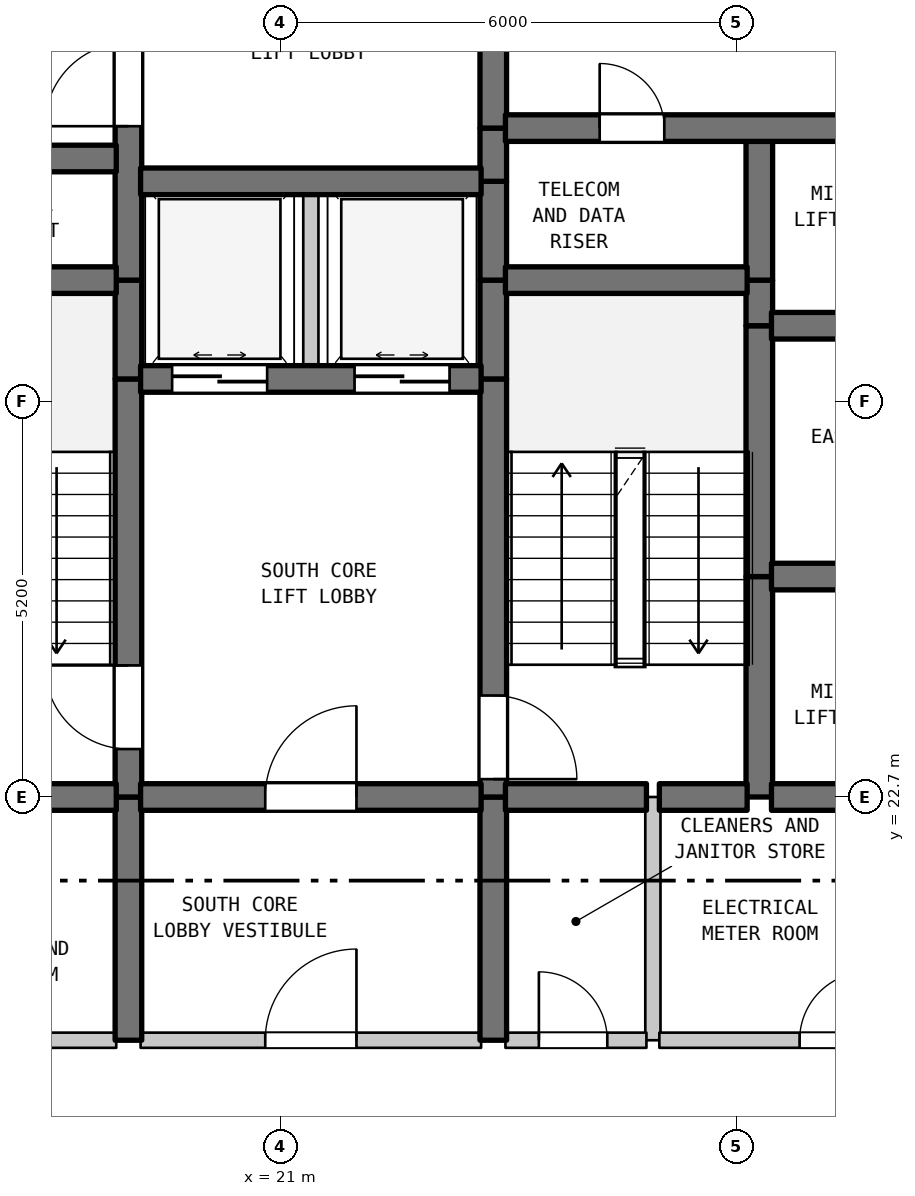
"""IFC4 building model, lengths in metres.
Left out: names, types, materials, properties, quantities, classifications, styles, units other than length and angle.
Written with IfcOpenShell. Run it as: python <this file> out.ifc"""

import sys

from ifc_helpers import new_model, si_unit, direction, frame, frame_2d, origin, place, context, subcontext, project, spatial, rectangle, extrude, element, fill, save


model = new_model("IFC4")
c1 = context("Model", 3, precision=1e-05, world=origin(), true_north=direction((0.0, 1.0)))
c2 = subcontext(c1, "Body", "Model", "MODEL_VIEW")
j1 = project(units=[si_unit("LENGTHUNIT", "METRE"), si_unit("PLANEANGLEUNIT", "RADIAN")], contexts=[c1])
p1 = place(None, origin())
s1 = spatial("IfcSite", under=j1, at=p1, CompositionType="ELEMENT")
p2 = place(p1, origin())
s2 = spatial("IfcBuilding", under=s1, at=p2, CompositionType="ELEMENT")
p3 = place(p2, frame((0.0, 0.0, 222.8)))
s3 = spatial("IfcBuildingStorey", under=s2, at=p3, CompositionType="ELEMENT", Elevation=222.8)
p4 = place(p3, frame((19.0, 19.5, 0.0), z_axis=(0.0, 0.0, 1.0), x_axis=(0.0, 1.0, 0.0)))
e1 = element("IfcWall", 1, at=p4, inside=s3, PredefinedType="SHEAR", context=c2, shape_type="SweptSolid", body=[
    extrude(rectangle(XDim=3.2, YDim=0.35, at=frame_2d((1.6, 0.0))), origin(), (0.0, 0.0, 1.0), 3.39),
])
p5 = place(p3, frame((19.0, 22.7, 0.0), z_axis=(0.0, 0.0, 1.0), x_axis=(0.0, 1.0, 0.0)))
e2 = element("IfcWall", 2, at=p5, inside=s3, PredefinedType="SHEAR", context=c2, shape_type="SweptSolid", body=[
    extrude(rectangle(XDim=5.5, YDim=0.35, at=frame_2d((2.75, 0.0))), origin(), (0.0, 0.0, 1.0), 3.39),
])
p6 = place(p5, frame((0.631, 0.0, 0.0)))
e3 = element("IfcOpeningElement", 3, at=p6, cuts=e2, PredefinedType="OPENING", context=c2, shape_type="SweptSolid", body=[
    extrude(rectangle(XDim=1.1, YDim=2.15, at=frame_2d((0.55, 1.075))), frame((0.0, 0.185, 0.0), z_axis=(0.0, -1.0, 0.0), x_axis=(1.0, 0.0, 0.0)), (0.0, 0.0, 1.0), 0.37),
])
p7 = place(p3, frame((19.0, 28.2, 0.0), z_axis=(0.0, 0.0, 1.0), x_axis=(0.0, 1.0, 0.0)))
e4 = element("IfcWall", 4, at=p7, inside=s3, PredefinedType="SHEAR", context=c2, shape_type="SweptSolid", body=[
    extrude(rectangle(XDim=1.3, YDim=0.35, at=frame_2d((0.65, 0.0))), origin(), (0.0, 0.0, 1.0), 3.39),
])
p8 = place(p3, frame((19.0, 29.5, 0.0), z_axis=(0.0, 0.0, 1.0), x_axis=(0.0, 1.0, 0.0)))
e5 = element("IfcWall", 5, at=p8, inside=s3, PredefinedType="SHEAR", context=c2, shape_type="SweptSolid", body=[
    extrude(rectangle(XDim=5.5, YDim=0.35, at=frame_2d((2.75, 0.0))), origin(), (0.0, 0.0, 1.0), 3.39),
])
p9 = place(p8, frame((2.025, 0.0, 0.0)))
e6 = element("IfcOpeningElement", 6, at=p9, cuts=e5, PredefinedType="OPENING", context=c2, shape_type="SweptSolid", body=[
    extrude(rectangle(XDim=1.1, YDim=2.15, at=frame_2d((0.55, 1.075))), frame((0.0, 0.185, 0.0), z_axis=(0.0, -1.0, 0.0), x_axis=(1.0, 0.0, 0.0)), (0.0, 0.0, 1.0), 0.37),
])
p10 = place(p3, frame((21.4, 28.2, 0.0), z_axis=(0.0, 0.0, 1.0), x_axis=(0.0, 1.0, 0.0)))
e7 = element("IfcWall", 7, at=p10, inside=s3, PredefinedType="STANDARD", context=c2, shape_type="SweptSolid", body=[
    extrude(rectangle(XDim=2.6, YDim=0.2, at=frame_2d((1.3, 0.0))), origin(), (0.0, 0.0, 1.0), 3.39),
])
p11 = place(p3, frame((23.8, 19.5, 0.0), z_axis=(0.0, 0.0, 1.0), x_axis=(0.0, 1.0, 0.0)))
e8 = element("IfcWall", 8, at=p11, inside=s3, PredefinedType="SHEAR", context=c2, shape_type="SweptSolid", body=[
    extrude(rectangle(XDim=3.2, YDim=0.35, at=frame_2d((1.6, 0.0))), origin(), (0.0, 0.0, 1.0), 3.39),
])
p12 = place(p3, frame((23.8, 22.7, 0.0), z_axis=(0.0, 0.0, 1.0), x_axis=(0.0, 1.0, 0.0)))
e9 = element("IfcWall", 9, at=p12, inside=s3, PredefinedType="SHEAR", context=c2, shape_type="SweptSolid", body=[
    extrude(rectangle(XDim=5.5, YDim=0.35, at=frame_2d((2.75, 0.0))), origin(), (0.0, 0.0, 1.0), 3.39),
])
p13 = place(p12, frame((0.235, 0.0, 0.0)))
e10 = element("IfcOpeningElement", 10, at=p13, cuts=e9, PredefinedType="OPENING", context=c2, shape_type="SweptSolid", body=[
    extrude(rectangle(XDim=1.1, YDim=2.15, at=frame_2d((0.55, 1.075))), frame((0.0, 0.185, 0.0), z_axis=(0.0, -1.0, 0.0), x_axis=(1.0, 0.0, 0.0)), (0.0, 0.0, 1.0), 0.37),
])
for number, where, z_axis, x_axis in (
    (11, (23.8, 28.2, 0.0), (0.0, 0.0, 1.0), (0.0, 1.0, 0.0)),
    (12, (23.8, 29.5, 0.0), (0.0, 0.0, 1.0), (0.0, 1.0, 0.0)),
):
    element("IfcWall", number, at=place(p3, frame(where, z_axis=z_axis, x_axis=x_axis)), inside=s3, PredefinedType="SHEAR", context=c2, shape_type="SweptSolid", body=[
        extrude(rectangle(XDim=1.3, YDim=0.35, at=frame_2d((0.65, 0.0))), origin(), (0.0, 0.0, 1.0), 3.39),
    ])
p14 = place(p3, frame((23.8, 30.8, 0.0), z_axis=(0.0, 0.0, 1.0), x_axis=(0.0, 1.0, 0.0)))
e13 = element("IfcWall", 13, at=p14, inside=s3, PredefinedType="SHEAR", context=c2, shape_type="SweptSolid", body=[
    extrude(rectangle(XDim=0.7, YDim=0.35, at=frame_2d((0.35, 0.0))), origin(), (0.0, 0.0, 1.0), 3.39),
])
p15 = place(p3, frame((23.8, 31.5, 0.0), z_axis=(0.0, 0.0, 1.0), x_axis=(0.0, 1.0, 0.0)))
e14 = element("IfcWall", 14, at=p15, inside=s3, PredefinedType="SHEAR", context=c2, shape_type="SweptSolid", body=[
    extrude(rectangle(XDim=3.5, YDim=0.35, at=frame_2d((1.75, 0.0))), origin(), (0.0, 0.0, 1.0), 3.39),
])
p16 = place(p15, frame((1.127, 0.0, 0.0)))
e15 = element("IfcOpeningElement", 15, at=p16, cuts=e14, PredefinedType="OPENING", context=c2, shape_type="SweptSolid", body=[
    extrude(rectangle(XDim=1.1, YDim=2.15, at=frame_2d((0.55, 1.075))), frame((0.0, 0.185, 0.0), z_axis=(0.0, -1.0, 0.0), x_axis=(1.0, 0.0, 0.0)), (0.0, 0.0, 1.0), 0.37),
])
p17 = place(p3, frame((25.9, 19.5, 0.0), z_axis=(0.0, 0.0, 1.0), x_axis=(0.0, 1.0, 0.0)))
e16 = element("IfcWall", 16, at=p17, inside=s3, PredefinedType="STANDARD", context=c2, shape_type="SweptSolid", body=[
    extrude(rectangle(XDim=3.2, YDim=0.2, at=frame_2d((1.6, 0.0))), origin(), (0.0, 0.0, 1.0), 3.39),
])
p18 = place(p3, frame((27.3, 22.7, 0.0), z_axis=(0.0, 0.0, 1.0), x_axis=(0.0, 1.0, 0.0)))
e17 = element("IfcWall", 17, at=p18, inside=s3, PredefinedType="SHEAR", context=c2, shape_type="SweptSolid", body=[
    extrude(rectangle(XDim=2.9, YDim=0.35, at=frame_2d((1.45, 0.0))), origin(), (0.0, 0.0, 1.0), 3.39),
])
p19 = place(p3, frame((27.3, 25.6, 0.0), z_axis=(0.0, 0.0, 1.0), x_axis=(0.0, 1.0, 0.0)))
e18 = element("IfcWall", 18, at=p19, inside=s3, PredefinedType="SHEAR", context=c2, shape_type="SweptSolid", body=[
    extrude(rectangle(XDim=3.3, YDim=0.35, at=frame_2d((1.65, 0.0))), origin(), (0.0, 0.0, 1.0), 3.39),
])
p20 = place(p3, frame((27.3, 28.9, 0.0), z_axis=(0.0, 0.0, 1.0), x_axis=(0.0, 1.0, 0.0)))
e19 = element("IfcWall", 19, at=p20, inside=s3, PredefinedType="SHEAR", context=c2, shape_type="SweptSolid", body=[
    extrude(rectangle(XDim=0.6, YDim=0.35, at=frame_2d((0.3, 0.0))), origin(), (0.0, 0.0, 1.0), 3.39),
])
p21 = place(p3, frame((27.3, 29.5, 0.0), z_axis=(0.0, 0.0, 1.0), x_axis=(0.0, 1.0, 0.0)))
e20 = element("IfcWall", 20, at=p21, inside=s3, PredefinedType="SHEAR", context=c2, shape_type="SweptSolid", body=[
    extrude(rectangle(XDim=2.0, YDim=0.35, at=frame_2d((1.0, 0.0))), origin(), (0.0, 0.0, 1.0), 3.39),
])
p22 = place(p3, frame((15.16, 19.5, 0.0), z_axis=(0.0, 0.0, 1.0), x_axis=(1.0, 0.0, 0.0)))
e21 = element("IfcWall", 21, at=p22, inside=s3, PredefinedType="STANDARD", context=c2, shape_type="SweptSolid", body=[
    extrude(rectangle(XDim=3.68, YDim=0.2, at=frame_2d((1.84, 0.0))), origin(), (0.0, 0.0, 1.0), 3.39),
])
p23 = place(p22, frame((1.39, 0.0, 0.0)))
e22 = element("IfcOpeningElement", 22, at=p23, cuts=e21, PredefinedType="OPENING", context=c2, shape_type="SweptSolid", body=[
    extrude(rectangle(XDim=0.9, YDim=2.15, at=frame_2d((0.45, 1.075))), frame((0.0, 0.11, 0.0), z_axis=(0.0, -1.0, 0.0), x_axis=(1.0, 0.0, 0.0)), (0.0, 0.0, 1.0), 0.22),
])
p24 = place(p3, frame((19.16, 19.5, 0.0), z_axis=(0.0, 0.0, 1.0), x_axis=(1.0, 0.0, 0.0)))
e23 = element("IfcWall", 23, at=p24, inside=s3, PredefinedType="STANDARD", context=c2, shape_type="SweptSolid", body=[
    extrude(rectangle(XDim=4.48, YDim=0.2, at=frame_2d((2.24, 0.0))), origin(), (0.0, 0.0, 1.0), 3.39),
])
p25 = place(p24, frame((1.64, 0.0, 0.0)))
e24 = element("IfcOpeningElement", 24, at=p25, cuts=e23, PredefinedType="OPENING", context=c2, shape_type="SweptSolid", body=[
    extrude(rectangle(XDim=1.2, YDim=2.2, at=frame_2d((0.6, 1.1))), frame((0.0, 0.11, 0.0), z_axis=(0.0, -1.0, 0.0), x_axis=(1.0, 0.0, 0.0)), (0.0, 0.0, 1.0), 0.22),
])
p26 = place(p3, frame((23.96, 19.5, 0.0), z_axis=(0.0, 0.0, 1.0), x_axis=(1.0, 0.0, 0.0)))
e25 = element("IfcWall", 25, at=p26, inside=s3, PredefinedType="STANDARD", context=c2, shape_type="SweptSolid", body=[
    extrude(rectangle(XDim=1.855, YDim=0.2, at=frame_2d((0.927, 0.0))), origin(), (0.0, 0.0, 1.0), 3.39),
])
p27 = place(p26, frame((0.44, 0.0, 0.0)))
e26 = element("IfcOpeningElement", 26, at=p27, cuts=e25, PredefinedType="OPENING", context=c2, shape_type="SweptSolid", body=[
    extrude(rectangle(XDim=0.9, YDim=2.15, at=frame_2d((0.45, 1.075))), frame((0.0, 0.11, 0.0), z_axis=(0.0, -1.0, 0.0), x_axis=(1.0, 0.0, 0.0)), (0.0, 0.0, 1.0), 0.22),
])
p28 = place(p3, frame((25.985, 19.5, 0.0), z_axis=(0.0, 0.0, 1.0), x_axis=(1.0, 0.0, 0.0)))
e27 = element("IfcWall", 27, at=p28, inside=s3, PredefinedType="STANDARD", context=c2, shape_type="SweptSolid", body=[
    extrude(rectangle(XDim=4.655, YDim=0.2, at=frame_2d((2.327, 0.0))), origin(), (0.0, 0.0, 1.0), 3.39),
])
p29 = place(p28, frame((1.845, 0.0, 0.0)))
e28 = element("IfcOpeningElement", 28, at=p29, cuts=e27, PredefinedType="OPENING", context=c2, shape_type="SweptSolid", body=[
    extrude(rectangle(XDim=0.9, YDim=2.15, at=frame_2d((0.45, 1.075))), frame((0.0, 0.11, 0.0), z_axis=(0.0, -1.0, 0.0), x_axis=(1.0, 0.0, 0.0)), (0.0, 0.0, 1.0), 0.22),
])
p30 = place(p3, frame((15.16, 22.7, 0.0), z_axis=(0.0, 0.0, 1.0), x_axis=(1.0, 0.0, 0.0)))
e29 = element("IfcWall", 29, at=p30, inside=s3, PredefinedType="SHEAR", context=c2, shape_type="SweptSolid", body=[
    extrude(rectangle(XDim=3.68, YDim=0.35, at=frame_2d((1.84, 0.0))), origin(), (0.0, 0.0, 1.0), 3.39),
])
p31 = place(p3, frame((19.16, 22.7, 0.0), z_axis=(0.0, 0.0, 1.0), x_axis=(1.0, 0.0, 0.0)))
e30 = element("IfcWall", 30, at=p31, inside=s3, PredefinedType="SHEAR", context=c2, shape_type="SweptSolid", body=[
    extrude(rectangle(XDim=4.48, YDim=0.35, at=frame_2d((2.24, 0.0))), origin(), (0.0, 0.0, 1.0), 3.39),
])
p32 = place(p31, frame((1.64, 0.0, 0.0)))
e31 = element("IfcOpeningElement", 31, at=p32, cuts=e30, PredefinedType="OPENING", context=c2, shape_type="SweptSolid", body=[
    extrude(rectangle(XDim=1.2, YDim=2.2, at=frame_2d((0.6, 1.1))), frame((0.0, 0.185, 0.0), z_axis=(0.0, -1.0, 0.0), x_axis=(1.0, 0.0, 0.0)), (0.0, 0.0, 1.0), 0.37),
])
p33 = place(p3, frame((23.96, 22.7, 0.0), z_axis=(0.0, 0.0, 1.0), x_axis=(1.0, 0.0, 0.0)))
e32 = element("IfcWall", 32, at=p33, inside=s3, PredefinedType="SHEAR", context=c2, shape_type="SweptSolid", body=[
    extrude(rectangle(XDim=1.855, YDim=0.35, at=frame_2d((0.927, 0.0))), origin(), (0.0, 0.0, 1.0), 3.39),
])
p34 = place(p3, frame((25.985, 22.7, 0.0), z_axis=(0.0, 0.0, 1.0), x_axis=(1.0, 0.0, 0.0)))
e33 = element("IfcWall", 33, at=p34, inside=s3, PredefinedType="SHEAR", context=c2, shape_type="SweptSolid", body=[
    extrude(rectangle(XDim=1.155, YDim=0.35, at=frame_2d((0.577, 0.0))), origin(), (0.0, 0.0, 1.0), 3.39),
])
p35 = place(p3, frame((27.46, 22.7, 0.0), z_axis=(0.0, 0.0, 1.0), x_axis=(1.0, 0.0, 0.0)))
e34 = element("IfcWall", 34, at=p35, inside=s3, PredefinedType="SHEAR", context=c2, shape_type="SweptSolid", body=[
    extrude(rectangle(XDim=3.18, YDim=0.35, at=frame_2d((1.59, 0.0))), origin(), (0.0, 0.0, 1.0), 3.39),
])
p36 = place(p3, frame((27.46, 25.6, 0.0), z_axis=(0.0, 0.0, 1.0), x_axis=(1.0, 0.0, 0.0)))
e35 = element("IfcWall", 35, at=p36, inside=s3, PredefinedType="SHEAR", context=c2, shape_type="SweptSolid", body=[
    extrude(rectangle(XDim=3.18, YDim=0.35, at=frame_2d((1.59, 0.0))), origin(), (0.0, 0.0, 1.0), 3.39),
])
p37 = place(p36, frame((1.14, 0.0, 0.0)))
e36 = element("IfcOpeningElement", 36, at=p37, cuts=e35, PredefinedType="OPENING", context=c2, shape_type="SweptSolid", body=[
    extrude(rectangle(XDim=0.9, YDim=2.15, at=frame_2d((0.45, 1.075))), frame((0.0, 0.185, 0.0), z_axis=(0.0, -1.0, 0.0), x_axis=(1.0, 0.0, 0.0)), (0.0, 0.0, 1.0), 0.37),
])
p38 = place(p3, frame((19.16, 28.2, 0.0), z_axis=(0.0, 0.0, 1.0), x_axis=(1.0, 0.0, 0.0)))
e37 = element("IfcWall", 37, at=p38, inside=s3, PredefinedType="SHEAR", context=c2, shape_type="SweptSolid", body=[
    extrude(rectangle(XDim=4.48, YDim=0.35, at=frame_2d((2.24, 0.0))), origin(), (0.0, 0.0, 1.0), 3.39),
])
p39 = place(p38, frame((0.415, 0.0, 0.0)))
e38 = element("IfcOpeningElement", 38, at=p39, cuts=e37, PredefinedType="OPENING", context=c2, shape_type="SweptSolid", body=[
    extrude(rectangle(XDim=1.25, YDim=2.2, at=frame_2d((0.625, 1.1))), frame((0.0, 0.185, 0.0), z_axis=(0.0, -1.0, 0.0), x_axis=(1.0, 0.0, 0.0)), (0.0, 0.0, 1.0), 0.37),
])
p40 = place(p38, frame((2.815, 0.0, 0.0)))
e39 = element("IfcOpeningElement", 39, at=p40, cuts=e37, PredefinedType="OPENING", context=c2, shape_type="SweptSolid", body=[
    extrude(rectangle(XDim=1.25, YDim=2.2, at=frame_2d((0.625, 1.1))), frame((0.0, 0.185, 0.0), z_axis=(0.0, -1.0, 0.0), x_axis=(1.0, 0.0, 0.0)), (0.0, 0.0, 1.0), 0.37),
])
p41 = place(p3, frame((27.46, 28.9, 0.0), z_axis=(0.0, 0.0, 1.0), x_axis=(1.0, 0.0, 0.0)))
e40 = element("IfcWall", 40, at=p41, inside=s3, PredefinedType="SHEAR", context=c2, shape_type="SweptSolid", body=[
    extrude(rectangle(XDim=3.18, YDim=0.35, at=frame_2d((1.59, 0.0))), origin(), (0.0, 0.0, 1.0), 3.39),
])
p42 = place(p41, frame((1.14, 0.0, 0.0)))
e41 = element("IfcOpeningElement", 41, at=p42, cuts=e40, PredefinedType="OPENING", context=c2, shape_type="SweptSolid", body=[
    extrude(rectangle(XDim=0.9, YDim=2.15, at=frame_2d((0.45, 1.075))), frame((0.0, 0.185, 0.0), z_axis=(0.0, -1.0, 0.0), x_axis=(1.0, 0.0, 0.0)), (0.0, 0.0, 1.0), 0.37),
])
p43 = place(p3, frame((15.16, 29.5, 0.0), z_axis=(0.0, 0.0, 1.0), x_axis=(1.0, 0.0, 0.0)))
e42 = element("IfcWall", 42, at=p43, inside=s3, PredefinedType="SHEAR", context=c2, shape_type="SweptSolid", body=[
    extrude(rectangle(XDim=3.68, YDim=0.35, at=frame_2d((1.84, 0.0))), origin(), (0.0, 0.0, 1.0), 3.39),
])
p44 = place(p3, frame((23.96, 29.5, 0.0), z_axis=(0.0, 0.0, 1.0), x_axis=(1.0, 0.0, 0.0)))
e43 = element("IfcWall", 43, at=p44, inside=s3, PredefinedType="SHEAR", context=c2, shape_type="SweptSolid", body=[
    extrude(rectangle(XDim=3.18, YDim=0.35, at=frame_2d((1.59, 0.0))), origin(), (0.0, 0.0, 1.0), 3.39),
])
p45 = place(p3, frame((19.16, 30.8, 0.0), z_axis=(0.0, 0.0, 1.0), x_axis=(1.0, 0.0, 0.0)))
e44 = element("IfcWall", 44, at=p45, inside=s3, PredefinedType="SHEAR", context=c2, shape_type="SweptSolid", body=[
    extrude(rectangle(XDim=4.48, YDim=0.35, at=frame_2d((2.24, 0.0))), origin(), (0.0, 0.0, 1.0), 3.39),
])
p46 = place(p3, frame((15.16, 31.1, 0.0), z_axis=(0.0, 0.0, 1.0), x_axis=(1.0, 0.0, 0.0)))
e45 = element("IfcWall", 45, at=p46, inside=s3, PredefinedType="SHEAR", context=c2, shape_type="SweptSolid", body=[
    extrude(rectangle(XDim=3.68, YDim=0.35, at=frame_2d((1.84, 0.0))), origin(), (0.0, 0.0, 1.0), 3.39),
])
p47 = place(p3, frame((23.96, 31.5, 0.0), z_axis=(0.0, 0.0, 1.0), x_axis=(1.0, 0.0, 0.0)))
e46 = element("IfcWall", 46, at=p47, inside=s3, PredefinedType="SHEAR", context=c2, shape_type="SweptSolid", body=[
    extrude(rectangle(XDim=6.68, YDim=0.35, at=frame_2d((3.34, 0.0))), origin(), (0.0, 0.0, 1.0), 3.39),
])
p48 = place(p47, frame((1.24, 0.0, 0.0)))
e47 = element("IfcOpeningElement", 47, at=p48, cuts=e46, PredefinedType="OPENING", context=c2, shape_type="SweptSolid", body=[
    extrude(rectangle(XDim=0.85, YDim=2.1, at=frame_2d((0.425, 1.05))), frame((0.0, 0.185, 0.0), z_axis=(0.0, -1.0, 0.0), x_axis=(1.0, 0.0, 0.0)), (0.0, 0.0, 1.0), 0.37),
])
p49 = place(p6, origin())
e48 = element("IfcDoor", 48, at=p49, inside=s3, OperationType="SINGLE_SWING_RIGHT", PredefinedType="DOOR", context=c2, shape_type="SweptSolid", body=[
    extrude(rectangle(XDim=1.1, YDim=2.15, at=frame_2d((0.55, 1.075))), frame((0.0, 0.025, 0.0), z_axis=(0.0, -1.0, 0.0), x_axis=(1.0, 0.0, 0.0)), (0.0, 0.0, 1.0), 0.05),
])
fill(e3, e48)
p50 = place(p9, origin())
e49 = element("IfcDoor", 49, at=p50, inside=s3, OperationType="SINGLE_SWING_LEFT", PredefinedType="DOOR", context=c2, shape_type="SweptSolid", body=[
    extrude(rectangle(XDim=1.1, YDim=2.15, at=frame_2d((0.55, 1.075))), frame((0.0, 0.025, 0.0), z_axis=(0.0, -1.0, 0.0), x_axis=(1.0, 0.0, 0.0)), (0.0, 0.0, 1.0), 0.05),
])
fill(e6, e49)
p51 = place(p13, frame((1.1, 0.0, 0.0), z_axis=(0.0, 0.0, 1.0), x_axis=(-1.0, 0.0, 0.0)))
e50 = element("IfcDoor", 50, at=p51, inside=s3, OperationType="SINGLE_SWING_LEFT", PredefinedType="DOOR", context=c2, shape_type="SweptSolid", body=[
    extrude(rectangle(XDim=1.1, YDim=2.15, at=frame_2d((0.55, 1.075))), frame((0.0, 0.025, 0.0), z_axis=(0.0, -1.0, 0.0), x_axis=(1.0, 0.0, 0.0)), (0.0, 0.0, 1.0), 0.05),
])
fill(e10, e50)
p52 = place(p25, origin())
e51 = element("IfcDoor", 51, at=p52, inside=s3, OperationType="SINGLE_SWING_RIGHT", PredefinedType="DOOR", context=c2, shape_type="SweptSolid", body=[
    extrude(rectangle(XDim=1.2, YDim=2.2, at=frame_2d((0.6, 1.1))), frame((0.0, 0.025, 0.0), z_axis=(0.0, -1.0, 0.0), x_axis=(1.0, 0.0, 0.0)), (0.0, 0.0, 1.0), 0.05),
])
fill(e24, e51)
p53 = place(p27, origin())
e52 = element("IfcDoor", 52, at=p53, inside=s3, OperationType="SINGLE_SWING_LEFT", PredefinedType="DOOR", context=c2, shape_type="SweptSolid", body=[
    extrude(rectangle(XDim=0.9, YDim=2.15, at=frame_2d((0.45, 1.075))), frame((0.0, 0.025, 0.0), z_axis=(0.0, -1.0, 0.0), x_axis=(1.0, 0.0, 0.0)), (0.0, 0.0, 1.0), 0.05),
])
fill(e26, e52)
p54 = place(p29, origin())
e53 = element("IfcDoor", 53, at=p54, inside=s3, OperationType="SINGLE_SWING_RIGHT", PredefinedType="DOOR", context=c2, shape_type="SweptSolid", body=[
    extrude(rectangle(XDim=0.9, YDim=2.15, at=frame_2d((0.45, 1.075))), frame((0.0, 0.025, 0.0), z_axis=(0.0, -1.0, 0.0), x_axis=(1.0, 0.0, 0.0)), (0.0, 0.0, 1.0), 0.05),
])
fill(e28, e53)
p55 = place(p32, origin())
e54 = element("IfcDoor", 54, at=p55, inside=s3, OperationType="SINGLE_SWING_RIGHT", PredefinedType="DOOR", context=c2, shape_type="SweptSolid", body=[
    extrude(rectangle(XDim=1.2, YDim=2.2, at=frame_2d((0.6, 1.1))), frame((0.0, 0.025, 0.0), z_axis=(0.0, -1.0, 0.0), x_axis=(1.0, 0.0, 0.0)), (0.0, 0.0, 1.0), 0.05),
])
fill(e31, e54)
p56 = place(p39, origin())
e55 = element("IfcDoor", 55, at=p56, inside=s3, OperationType="DOUBLE_DOOR_SLIDING", PredefinedType="DOOR", context=c2, shape_type="SweptSolid", body=[
    extrude(rectangle(XDim=1.25, YDim=2.2, at=frame_2d((0.625, 1.1))), frame((0.0, 0.025, 0.0), z_axis=(0.0, -1.0, 0.0), x_axis=(1.0, 0.0, 0.0)), (0.0, 0.0, 1.0), 0.05),
])
fill(e38, e55)
p57 = place(p40, origin())
e56 = element("IfcDoor", 56, at=p57, inside=s3, OperationType="DOUBLE_DOOR_SLIDING", PredefinedType="DOOR", context=c2, shape_type="SweptSolid", body=[
    extrude(rectangle(XDim=1.25, YDim=2.2, at=frame_2d((0.625, 1.1))), frame((0.0, 0.025, 0.0), z_axis=(0.0, -1.0, 0.0), x_axis=(1.0, 0.0, 0.0)), (0.0, 0.0, 1.0), 0.05),
])
fill(e39, e56)
p58 = place(p48, origin())
e57 = element("IfcDoor", 57, at=p58, inside=s3, OperationType="SINGLE_SWING_LEFT", PredefinedType="DOOR", context=c2, shape_type="SweptSolid", body=[
    extrude(rectangle(XDim=0.85, YDim=2.1, at=frame_2d((0.425, 1.05))), frame((0.0, 0.025, 0.0), z_axis=(0.0, -1.0, 0.0), x_axis=(1.0, 0.0, 0.0)), (0.0, 0.0, 1.0), 0.05),
])
fill(e47, e57)
save(model, sys.argv[1])
